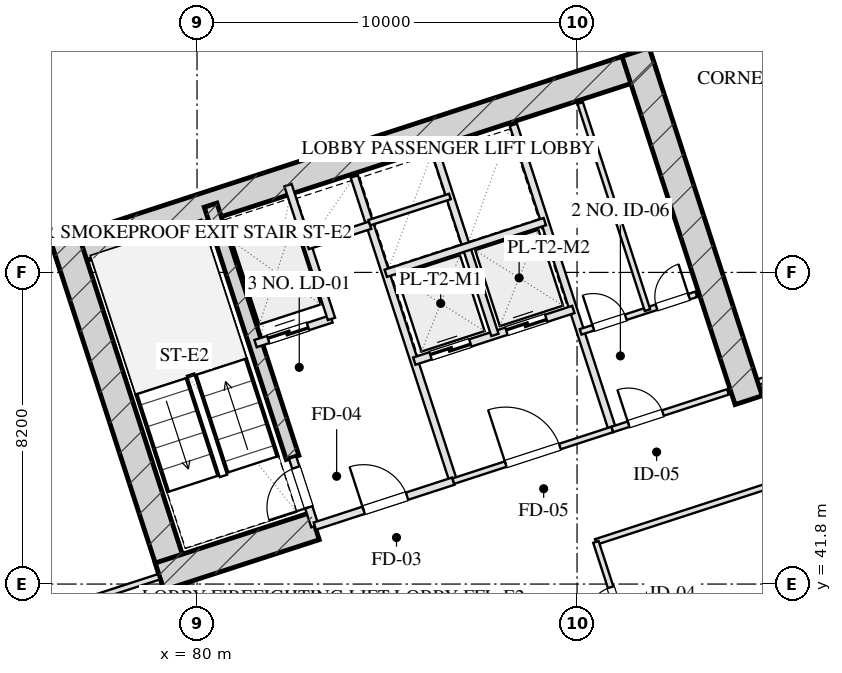
"""IFC4 building model, lengths in metres.
Left out: names, types, materials, properties, quantities, classifications, styles, units other than length and angle.
Written with IfcOpenShell. Run it as: python <this file> out.ifc"""

import sys

from ifc_helpers import new_model, si_unit, direction, frame, frame_2d, origin, place, context, subcontext, project, spatial, rectangle, extrude, element, fill, save


model = new_model("IFC4")
c1 = context("Model", 3, precision=1e-05, world=origin(), true_north=direction((0.0, 1.0)))
c2 = subcontext(c1, "Body", "Model", "MODEL_VIEW")
j1 = project(units=[si_unit("LENGTHUNIT", "METRE"), si_unit("PLANEANGLEUNIT", "RADIAN")], contexts=[c1])
p1 = place(None, origin())
s1 = spatial("IfcSite", under=j1, at=p1, CompositionType="ELEMENT")
p2 = place(p1, origin())
s2 = spatial("IfcBuilding", under=s1, at=p2, CompositionType="ELEMENT")
p3 = place(p2, frame((0.0, 0.0, 64.4)))
s3 = spatial("IfcBuildingStorey", under=s2, at=p3, CompositionType="ELEMENT", Elevation=64.4)
p4 = place(p3, frame((76.272, 50.443, 0.0), z_axis=(0.0, 0.0, 1.0), x_axis=(0.951056072937, 0.309018358888, 0.0)))
e1 = element("IfcWall", 1, at=p4, inside=s3, PredefinedType="SHEAR", context=c2, shape_type="SweptSolid", body=[
    extrude(rectangle(XDim=16.55, YDim=0.75, at=frame_2d((8.275, 0.0))), origin(), (0.0, 0.0, 1.0), 3.45),
])
for number, where, z_axis, x_axis in (
    (2, (79.489, 41.756, 0.0), (0.0, 0.0, 1.0), (-0.309, 0.951, 0.0)),
    (3, (94.515, 46.639, 0.0), (0.0, 0.0, 1.0), (-0.309, 0.951, 0.0)),
):
    element("IfcWall", number, at=place(p3, frame(where, z_axis=z_axis, x_axis=x_axis)), inside=s3, PredefinedType="SHEAR", context=c2, shape_type="SweptSolid", body=[
        extrude(rectangle(XDim=9.63, YDim=0.75, at=frame_2d((4.815, 0.0))), origin(), (0.0, 0.0, 1.0), 3.45),
    ])
p5 = place(p3, frame((82.514, 45.131, 0.0), z_axis=(0.0, 0.0, 1.0), x_axis=(-0.308988790936, 0.951065679686, 0.0)))
e4 = element("IfcWall", 4, at=p5, inside=s3, PredefinedType="SHEAR", context=c2, shape_type="SweptSolid", body=[
    extrude(rectangle(XDim=6.98, YDim=0.35, at=frame_2d((3.49, 0.0))), origin(), (0.0, 0.0, 1.0), 3.45),
])
p6 = place(p3, frame((79.016, 41.997, 0.0), z_axis=(0.0, 0.0, 1.0), x_axis=(0.95106038264, 0.309005094736, 0.0)))
e5 = element("IfcWall", 5, at=p6, inside=s3, PredefinedType="SHEAR", context=c2, shape_type="SweptSolid", body=[
    extrude(rectangle(XDim=4.295, YDim=0.75, at=frame_2d((2.147, 0.0))), origin(), (0.0, 0.0, 1.0), 3.45),
])
p7 = place(p3, frame((79.655, 4.352, 0.0), z_axis=(0.0, 0.0, 1.0), x_axis=(-0.309014526607, 0.951057318118, 0.0)))
e6 = element("IfcWall", 6, at=p7, inside=s3, PredefinedType="SOLIDWALL", context=c2, shape_type="SweptSolid", body=[
    extrude(rectangle(XDim=50.0, YDim=0.4, at=frame_2d((25.0, 0.0))), origin(), (0.0, 0.0, 1.0), 2.61),
])
p8 = place(p7, frame((17.35, 0.0, 0.75)))
e7 = element("IfcOpeningElement", 7, at=p8, cuts=e6, PredefinedType="OPENING", context=c2, shape_type="SweptSolid", body=[
    extrude(rectangle(XDim=2.5, YDim=1.46, at=frame_2d((1.25, 0.73))), frame((0.0, 0.21, 0.0), z_axis=(0.0, -1.0, 0.0), x_axis=(1.0, 0.0, 0.0)), (0.0, 0.0, 1.0), 0.42),
])
p9 = place(p7, frame((30.15, 0.0, 0.75)))
e8 = element("IfcOpeningElement", 8, at=p9, cuts=e6, PredefinedType="OPENING", context=c2, shape_type="SweptSolid", body=[
    extrude(rectangle(XDim=2.5, YDim=1.46, at=frame_2d((1.25, 0.73))), frame((0.0, 0.21, 0.0), z_axis=(0.0, -1.0, 0.0), x_axis=(1.0, 0.0, 0.0)), (0.0, 0.0, 1.0), 0.42),
])
p10 = place(p3, frame((66.002, 55.433, 0.0), z_axis=(0.0, 0.0, 1.0), x_axis=(0.951055939317, 0.309018770125, 0.0)))
e9 = element("IfcWall", 9, at=p10, inside=s3, PredefinedType="SOLIDWALL", context=c2, shape_type="SweptSolid", body=[
    extrude(rectangle(XDim=32.4, YDim=0.4, at=frame_2d((16.2, 0.0))), origin(), (0.0, 0.0, 1.0), 2.61),
])
p11 = place(p3, frame((83.101, 43.324, 0.0), z_axis=(0.0, 0.0, 1.0), x_axis=(-0.309048298632, 0.951046344356, 0.0)))
e10 = element("IfcWall", 10, at=p11, inside=s3, PredefinedType="PARTITIONING", context=c2, shape_type="SweptSolid", body=[
    extrude(rectangle(XDim=1.9, YDim=0.2, at=frame_2d((0.95, 0.0))), origin(), (0.0, 0.0, 1.0), 3.175),
])
p12 = place(p11, frame((0.52, 0.0, 0.0)))
e11 = element("IfcOpeningElement", 11, at=p12, cuts=e10, PredefinedType="OPENING", context=c2, shape_type="SweptSolid", body=[
    extrude(rectangle(XDim=1.1, YDim=2.05, at=frame_2d((0.55, 1.025))), frame((0.0, 0.11, 0.0), z_axis=(0.0, -1.0, 0.0), x_axis=(1.0, 0.0, 0.0)), (0.0, 0.0, 1.0), 0.22),
])
p13 = place(p3, frame((86.743, 44.508, 0.0), z_axis=(0.0, 0.0, 1.0), x_axis=(-0.309016001439, 0.951056838919, 0.0)))
e12 = element("IfcWall", 12, at=p13, inside=s3, PredefinedType="PARTITIONING", context=c2, shape_type="SweptSolid", body=[
    extrude(rectangle(XDim=8.43, YDim=0.2, at=frame_2d((4.215, 0.0))), origin(), (0.0, 0.0, 1.0), 3.175),
])
p14 = place(p3, frame((83.101, 43.324, 0.0), z_axis=(0.0, 0.0, 1.0), x_axis=(0.951052804469, 0.309028417967, 0.0)))
e13 = element("IfcWall", 13, at=p14, inside=s3, PredefinedType="PARTITIONING", context=c2, shape_type="SweptSolid", body=[
    extrude(rectangle(XDim=3.83, YDim=0.2, at=frame_2d((1.915, 0.0))), origin(), (0.0, 0.0, 1.0), 3.175),
])
p15 = place(p14, frame((1.35, 0.0, 0.0)))
e14 = element("IfcOpeningElement", 14, at=p15, cuts=e13, PredefinedType="OPENING", context=c2, shape_type="SweptSolid", body=[
    extrude(rectangle(XDim=1.2, YDim=2.05, at=frame_2d((0.6, 1.025))), frame((0.0, 0.11, 0.0), z_axis=(0.0, -1.0, 0.0), x_axis=(1.0, 0.0, 0.0)), (0.0, 0.0, 1.0), 0.22),
])
p16 = place(p3, frame((81.54, 48.127, 0.0), z_axis=(0.0, 0.0, 1.0), x_axis=(0.951062257173, 0.308999325213, 0.0)))
e15 = element("IfcWall", 15, at=p16, inside=s3, PredefinedType="PARTITIONING", context=c2, shape_type="SweptSolid", body=[
    extrude(rectangle(XDim=2.1, YDim=0.2, at=frame_2d((1.05, 0.0))), origin(), (0.0, 0.0, 1.0), 3.175),
])
p17 = place(p16, frame((0.35, 0.0, 0.0)))
e16 = element("IfcOpeningElement", 16, at=p17, cuts=e15, PredefinedType="OPENING", context=c2, shape_type="SweptSolid", body=[
    extrude(rectangle(XDim=1.1, YDim=2.05, at=frame_2d((0.55, 1.025))), frame((0.0, 0.11, 0.0), z_axis=(0.0, -1.0, 0.0), x_axis=(1.0, 0.0, 0.0)), (0.0, 0.0, 1.0), 0.22),
])
p18 = place(p3, frame((83.538, 48.776, 0.0), z_axis=(0.0, 0.0, 1.0), x_axis=(-0.3089935693, 0.951064127245, 0.0)))
e17 = element("IfcWall", 17, at=p18, inside=s3, PredefinedType="PARTITIONING", context=c2, shape_type="SweptSolid", body=[
    extrude(rectangle(XDim=3.7, YDim=0.2, at=frame_2d((1.85, 0.0))), origin(), (0.0, 0.0, 1.0), 3.175),
])
p19 = place(p3, frame((82.91, 50.707, 0.0), z_axis=(0.0, 0.0, 1.0), x_axis=(0.951041328149, 0.309063734775, 0.0)))
e18 = element("IfcWall", 18, at=p19, inside=s3, PredefinedType="PARTITIONING", context=c2, shape_type="SweptSolid", body=[
    extrude(rectangle(XDim=1.73, YDim=0.2, at=frame_2d((0.865, 0.0))), origin(), (0.0, 0.0, 1.0), 3.175),
])
p20 = place(p3, frame((90.928, 45.868, 0.0), z_axis=(0.0, 0.0, 1.0), x_axis=(-0.309042196757, 0.951048327176, 0.0)))
e19 = element("IfcWall", 19, at=p20, inside=s3, PredefinedType="PARTITIONING", context=c2, shape_type="SweptSolid", body=[
    extrude(rectangle(XDim=8.43, YDim=0.2, at=frame_2d((4.215, 0.0))), origin(), (0.0, 0.0, 1.0), 3.175),
])
p21 = place(p3, frame((86.743, 44.508, 0.0), z_axis=(0.0, 0.0, 1.0), x_axis=(0.951063829732, 0.308994485023, 0.0)))
e20 = element("IfcWall", 20, at=p21, inside=s3, PredefinedType="PARTITIONING", context=c2, shape_type="SweptSolid", body=[
    extrude(rectangle(XDim=4.4, YDim=0.15, at=frame_2d((2.2, 0.0))), origin(), (0.0, 0.0, 1.0), 3.175),
])
p22 = place(p21, frame((1.45, 0.0, 0.0)))
e21 = element("IfcOpeningElement", 21, at=p22, cuts=e20, PredefinedType="OPENING", context=c2, shape_type="SweptSolid", body=[
    extrude(rectangle(XDim=1.5, YDim=2.05, at=frame_2d((0.75, 1.025))), frame((0.0, 0.085, 0.0), z_axis=(0.0, -1.0, 0.0), x_axis=(1.0, 0.0, 0.0)), (0.0, 0.0, 1.0), 0.17),
])
p23 = place(p3, frame((85.718, 47.666, 0.0), z_axis=(0.0, 0.0, 1.0), x_axis=(0.951058531764, 0.30901079133, 0.0)))
e22 = element("IfcWall", 22, at=p23, inside=s3, PredefinedType="PARTITIONING", context=c2, shape_type="SweptSolid", body=[
    extrude(rectangle(XDim=4.4, YDim=0.2, at=frame_2d((2.2, 0.0))), origin(), (0.0, 0.0, 1.0), 3.175),
])
p24 = place(p23, frame((0.45, 0.0, 0.0)))
e23 = element("IfcOpeningElement", 23, at=p24, cuts=e22, PredefinedType="OPENING", context=c2, shape_type="SweptSolid", body=[
    extrude(rectangle(XDim=1.1, YDim=2.05, at=frame_2d((0.55, 1.025))), frame((0.0, 0.11, 0.0), z_axis=(0.0, -1.0, 0.0), x_axis=(1.0, 0.0, 0.0)), (0.0, 0.0, 1.0), 0.22),
])
p25 = place(p23, frame((2.55, 0.0, 0.0)))
e24 = element("IfcOpeningElement", 24, at=p25, cuts=e22, PredefinedType="OPENING", context=c2, shape_type="SweptSolid", body=[
    extrude(rectangle(XDim=1.1, YDim=2.05, at=frame_2d((0.55, 1.025))), frame((0.0, 0.11, 0.0), z_axis=(0.0, -1.0, 0.0), x_axis=(1.0, 0.0, 0.0)), (0.0, 0.0, 1.0), 0.22),
])
p26 = place(p3, frame((87.838, 48.354, 0.0), z_axis=(0.0, 0.0, 1.0), x_axis=(-0.3090093719, 0.951058992953, 0.0)))
e25 = element("IfcWall", 25, at=p26, inside=s3, PredefinedType="PARTITIONING", context=c2, shape_type="SweptSolid", body=[
    extrude(rectangle(XDim=5.11, YDim=0.2, at=frame_2d((2.555, 0.0))), origin(), (0.0, 0.0, 1.0), 3.175),
])
p27 = place(p3, frame((84.967, 49.977, 0.0), z_axis=(0.0, 0.0, 1.0), x_axis=(0.951063829732, 0.308994485023, 0.0)))
e26 = element("IfcWall", 26, at=p27, inside=s3, PredefinedType="PARTITIONING", context=c2, shape_type="SweptSolid", body=[
    extrude(rectangle(XDim=4.4, YDim=0.2, at=frame_2d((2.2, 0.0))), origin(), (0.0, 0.0, 1.0), 3.175),
])
p28 = place(p3, frame((84.534, 51.308, 0.0), z_axis=(0.0, 0.0, 1.0), x_axis=(0.951075093106, 0.308959814982, 0.0)))
e27 = element("IfcWall", 27, at=p28, inside=s3, PredefinedType="PARTITIONING", context=c2, shape_type="SweptSolid", body=[
    extrude(rectangle(XDim=2.23, YDim=0.15, at=frame_2d((1.115, 0.0))), origin(), (0.0, 0.0, 1.0), 3.175),
])
p29 = place(p3, frame((90.928, 45.868, 0.0), z_axis=(0.0, 0.0, 1.0), x_axis=(0.951059297078, 0.309008435874, 0.0)))
e28 = element("IfcWall", 28, at=p29, inside=s3, PredefinedType="PARTITIONING", context=c2, shape_type="SweptSolid", body=[
    extrude(rectangle(XDim=3.2, YDim=0.15, at=frame_2d((1.6, 0.0))), origin(), (0.0, 0.0, 1.0), 3.175),
])
p30 = place(p29, frame((0.45, 0.0, 0.0)))
e29 = element("IfcOpeningElement", 29, at=p30, cuts=e28, PredefinedType="OPENING", context=c2, shape_type="SweptSolid", body=[
    extrude(rectangle(XDim=0.95, YDim=2.05, at=frame_2d((0.475, 1.025))), frame((0.0, 0.085, 0.0), z_axis=(0.0, -1.0, 0.0), x_axis=(1.0, 0.0, 0.0)), (0.0, 0.0, 1.0), 0.17),
])
p31 = place(p3, frame((90.094, 48.436, 0.0), z_axis=(0.0, 0.0, 1.0), x_axis=(0.951066581729, 0.308986014439, 0.0)))
e30 = element("IfcWall", 30, at=p31, inside=s3, PredefinedType="PARTITIONING", context=c2, shape_type="SweptSolid", body=[
    extrude(rectangle(XDim=3.2, YDim=0.15, at=frame_2d((1.6, 0.0))), origin(), (0.0, 0.0, 1.0), 3.175),
])
p32 = place(p31, frame((0.35, 0.0, 0.0)))
e31 = element("IfcOpeningElement", 31, at=p32, cuts=e30, PredefinedType="OPENING", context=c2, shape_type="SweptSolid", body=[
    extrude(rectangle(XDim=0.9, YDim=2.05, at=frame_2d((0.45, 1.025))), frame((0.0, 0.085, 0.0), z_axis=(0.0, -1.0, 0.0), x_axis=(1.0, 0.0, 0.0)), (0.0, 0.0, 1.0), 0.17),
])
p33 = place(p31, frame((2.1, 0.0, 0.0)))
e32 = element("IfcOpeningElement", 32, at=p33, cuts=e30, PredefinedType="OPENING", context=c2, shape_type="SweptSolid", body=[
    extrude(rectangle(XDim=0.9, YDim=2.05, at=frame_2d((0.45, 1.025))), frame((0.0, 0.085, 0.0), z_axis=(0.0, -1.0, 0.0), x_axis=(1.0, 0.0, 0.0)), (0.0, 0.0, 1.0), 0.17),
])
p34 = place(p3, frame((91.853, 49.007, 0.0), z_axis=(0.0, 0.0, 1.0), x_axis=(-0.309022487551, 0.951054731437, 0.0)))
e33 = element("IfcWall", 33, at=p34, inside=s3, PredefinedType="PARTITIONING", context=c2, shape_type="SweptSolid", body=[
    extrude(rectangle(XDim=5.73, YDim=0.15, at=frame_2d((2.865, 0.0))), origin(), (0.0, 0.0, 1.0), 3.175),
])
p35 = place(p3, frame((68.721, 38.652, 0.0), z_axis=(0.0, 0.0, 1.0), x_axis=(0.951056658866, 0.309016555588, 0.0)))
e34 = element("IfcWall", 34, at=p35, inside=s3, PredefinedType="PARTITIONING", context=c2, shape_type="SweptSolid", body=[
    extrude(rectangle(XDim=10.8, YDim=0.15, at=frame_2d((5.4, 0.0))), origin(), (0.0, 0.0, 1.0), 3.175),
])
p36 = place(p35, frame((4.536, 0.0, 0.0)))
e35 = element("IfcOpeningElement", 35, at=p36, cuts=e34, PredefinedType="OPENING", context=c2, shape_type="SweptSolid", body=[
    extrude(rectangle(XDim=0.85, YDim=2.05, at=frame_2d((0.425, 1.025))), frame((0.0, 0.085, 0.0), z_axis=(0.0, -1.0, 0.0), x_axis=(1.0, 0.0, 0.0)), (0.0, 0.0, 1.0), 0.17),
])
p37 = place(p3, frame((94.78, 47.119, 0.0), z_axis=(0.0, 0.0, 1.0), x_axis=(0.951054294345, 0.309023832749, 0.0)))
e36 = element("IfcWall", 36, at=p37, inside=s3, PredefinedType="PARTITIONING", context=c2, shape_type="SweptSolid", body=[
    extrude(rectangle(XDim=10.2, YDim=0.15, at=frame_2d((5.1, 0.0))), origin(), (0.0, 0.0, 1.0), 3.175),
])
p38 = place(p37, frame((4.284, 0.0, 0.0)))
e37 = element("IfcOpeningElement", 37, at=p38, cuts=e36, PredefinedType="OPENING", context=c2, shape_type="SweptSolid", body=[
    extrude(rectangle(XDim=1.0, YDim=2.05, at=frame_2d((0.5, 1.025))), frame((0.0, 0.085, 0.0), z_axis=(0.0, -1.0, 0.0), x_axis=(1.0, 0.0, 0.0)), (0.0, 0.0, 1.0), 0.17),
])
p39 = place(p3, frame((69.549, 36.103, 0.0), z_axis=(0.0, 0.0, 1.0), x_axis=(0.951057299418, 0.309014584159, 0.0)))
e38 = element("IfcWall", 38, at=p39, inside=s3, PredefinedType="PARTITIONING", context=c2, shape_type="SweptSolid", body=[
    extrude(rectangle(XDim=17.375, YDim=0.15, at=frame_2d((8.688, 0.0))), origin(), (0.0, 0.0, 1.0), 3.175),
])
p40 = place(p3, frame((90.496, 42.909, 0.0), z_axis=(0.0, 0.0, 1.0), x_axis=(0.951055837847, 0.309019082414, 0.0)))
e39 = element("IfcWall", 39, at=p40, inside=s3, PredefinedType="PARTITIONING", context=c2, shape_type="SweptSolid", body=[
    extrude(rectangle(XDim=15.575, YDim=0.15, at=frame_2d((7.788, 0.0))), origin(), (0.0, 0.0, 1.0), 3.175),
])
p41 = place(p3, frame((95.638, 27.084, 0.0), z_axis=(0.0, 0.0, 1.0), x_axis=(-0.30901773025, 0.951056277195, 0.0)))
e40 = element("IfcWall", 40, at=p41, inside=s3, PredefinedType="PARTITIONING", context=c2, shape_type="SweptSolid", body=[
    extrude(rectangle(XDim=16.64, YDim=0.15, at=frame_2d((8.32, 0.0))), origin(), (0.0, 0.0, 1.0), 3.175),
])
p42 = place(p41, frame((1.655, 0.0, 0.0)))
e41 = element("IfcOpeningElement", 41, at=p42, cuts=e40, PredefinedType="OPENING", context=c2, shape_type="SweptSolid", body=[
    extrude(rectangle(XDim=1.0, YDim=2.05, at=frame_2d((0.5, 1.025))), frame((0.0, 0.085, 0.0), z_axis=(0.0, -1.0, 0.0), x_axis=(1.0, 0.0, 0.0)), (0.0, 0.0, 1.0), 0.17),
])
p43 = place(p41, frame((6.155, 0.0, 0.0)))
e42 = element("IfcOpeningElement", 42, at=p43, cuts=e40, PredefinedType="OPENING", context=c2, shape_type="SweptSolid", body=[
    extrude(rectangle(XDim=1.0, YDim=2.05, at=frame_2d((0.5, 1.025))), frame((0.0, 0.085, 0.0), z_axis=(0.0, -1.0, 0.0), x_axis=(1.0, 0.0, 0.0)), (0.0, 0.0, 1.0), 0.17),
])
p44 = place(p41, frame((10.565, 0.0, 0.0)))
e43 = element("IfcOpeningElement", 43, at=p44, cuts=e40, PredefinedType="OPENING", context=c2, shape_type="SweptSolid", body=[
    extrude(rectangle(XDim=1.0, YDim=2.05, at=frame_2d((0.5, 1.025))), frame((0.0, 0.085, 0.0), z_axis=(0.0, -1.0, 0.0), x_axis=(1.0, 0.0, 0.0)), (0.0, 0.0, 1.0), 0.17),
])
p45 = place(p41, frame((14.385, 0.0, 0.0)))
e44 = element("IfcOpeningElement", 44, at=p45, cuts=e40, PredefinedType="OPENING", context=c2, shape_type="SweptSolid", body=[
    extrude(rectangle(XDim=1.0, YDim=2.05, at=frame_2d((0.5, 1.025))), frame((0.0, 0.085, 0.0), z_axis=(0.0, -1.0, 0.0), x_axis=(1.0, 0.0, 0.0)), (0.0, 0.0, 1.0), 0.17),
])
p46 = place(p3, frame((91.581, 39.57, 0.0), z_axis=(0.0, 0.0, 1.0), x_axis=(0.951055837847, 0.309019082414, 0.0)))
e45 = element("IfcWall", 45, at=p46, inside=s3, PredefinedType="PARTITIONING", context=c2, shape_type="SweptSolid", body=[
    extrude(rectangle(XDim=15.575, YDim=0.15, at=frame_2d((7.788, 0.0))), origin(), (0.0, 0.0, 1.0), 3.175),
])
p47 = place(p12, origin())
e46 = element("IfcDoor", 46, at=p47, inside=s3, OperationType="SINGLE_SWING_LEFT", PredefinedType="DOOR", context=c2, shape_type="SweptSolid", body=[
    extrude(rectangle(XDim=1.1, YDim=2.05, at=frame_2d((0.55, 1.025))), frame((0.0, 0.025, 0.0), z_axis=(0.0, -1.0, 0.0), x_axis=(1.0, 0.0, 0.0)), (0.0, 0.0, 1.0), 0.05),
])
fill(e11, e46)
p48 = place(p15, origin())
e47 = element("IfcDoor", 47, at=p48, inside=s3, OperationType="SINGLE_SWING_LEFT", PredefinedType="DOOR", context=c2, shape_type="SweptSolid", body=[
    extrude(rectangle(XDim=1.2, YDim=2.05, at=frame_2d((0.6, 1.025))), frame((0.0, 0.025, 0.0), z_axis=(0.0, -1.0, 0.0), x_axis=(1.0, 0.0, 0.0)), (0.0, 0.0, 1.0), 0.05),
])
fill(e14, e47)
p49 = place(p17, origin())
e48 = element("IfcDoor", 48, at=p49, inside=s3, OperationType="DOUBLE_DOOR_SLIDING", PredefinedType="DOOR", context=c2, shape_type="SweptSolid", body=[
    extrude(rectangle(XDim=1.1, YDim=2.05, at=frame_2d((0.55, 1.025))), frame((0.0, 0.025, 0.0), z_axis=(0.0, -1.0, 0.0), x_axis=(1.0, 0.0, 0.0)), (0.0, 0.0, 1.0), 0.05),
])
fill(e16, e48)
p50 = place(p22, origin())
e49 = element("IfcDoor", 49, at=p50, inside=s3, OperationType="SINGLE_SWING_LEFT", PredefinedType="DOOR", context=c2, shape_type="SweptSolid", body=[
    extrude(rectangle(XDim=1.5, YDim=2.05, at=frame_2d((0.75, 1.025))), frame((0.0, 0.025, 0.0), z_axis=(0.0, -1.0, 0.0), x_axis=(1.0, 0.0, 0.0)), (0.0, 0.0, 1.0), 0.05),
])
fill(e21, e49)
p51 = place(p24, origin())
e50 = element("IfcDoor", 50, at=p51, inside=s3, OperationType="DOUBLE_DOOR_SLIDING", PredefinedType="DOOR", context=c2, shape_type="SweptSolid", body=[
    extrude(rectangle(XDim=1.1, YDim=2.05, at=frame_2d((0.55, 1.025))), frame((0.0, 0.025, 0.0), z_axis=(0.0, -1.0, 0.0), x_axis=(1.0, 0.0, 0.0)), (0.0, 0.0, 1.0), 0.05),
])
fill(e23, e50)
p52 = place(p25, origin())
e51 = element("IfcDoor", 51, at=p52, inside=s3, OperationType="DOUBLE_DOOR_SLIDING", PredefinedType="DOOR", context=c2, shape_type="SweptSolid", body=[
    extrude(rectangle(XDim=1.1, YDim=2.05, at=frame_2d((0.55, 1.025))), frame((0.0, 0.025, 0.0), z_axis=(0.0, -1.0, 0.0), x_axis=(1.0, 0.0, 0.0)), (0.0, 0.0, 1.0), 0.05),
])
fill(e24, e51)
p53 = place(p30, origin())
e52 = element("IfcDoor", 52, at=p53, inside=s3, OperationType="SINGLE_SWING_LEFT", PredefinedType="DOOR", context=c2, shape_type="SweptSolid", body=[
    extrude(rectangle(XDim=0.95, YDim=2.05, at=frame_2d((0.475, 1.025))), frame((0.0, 0.025, 0.0), z_axis=(0.0, -1.0, 0.0), x_axis=(1.0, 0.0, 0.0)), (0.0, 0.0, 1.0), 0.05),
])
fill(e29, e52)
p54 = place(p32, origin())
e53 = element("IfcDoor", 53, at=p54, inside=s3, OperationType="SINGLE_SWING_LEFT", PredefinedType="DOOR", context=c2, shape_type="SweptSolid", body=[
    extrude(rectangle(XDim=0.9, YDim=2.05, at=frame_2d((0.45, 1.025))), frame((0.0, 0.025, 0.0), z_axis=(0.0, -1.0, 0.0), x_axis=(1.0, 0.0, 0.0)), (0.0, 0.0, 1.0), 0.05),
])
fill(e31, e53)
p55 = place(p33, origin())
e54 = element("IfcDoor", 54, at=p55, inside=s3, OperationType="SINGLE_SWING_RIGHT", PredefinedType="DOOR", context=c2, shape_type="SweptSolid", body=[
    extrude(rectangle(XDim=0.9, YDim=2.05, at=frame_2d((0.45, 1.025))), frame((0.0, 0.025, 0.0), z_axis=(0.0, -1.0, 0.0), x_axis=(1.0, 0.0, 0.0)), (0.0, 0.0, 1.0), 0.05),
])
fill(e32, e54)
p56 = place(p45, origin())
e55 = element("IfcDoor", 55, at=p56, inside=s3, OperationType="SINGLE_SWING_LEFT", PredefinedType="DOOR", context=c2, shape_type="SweptSolid", body=[
    extrude(rectangle(XDim=1.0, YDim=2.05, at=frame_2d((0.5, 1.025))), frame((0.0, 0.025, 0.0), z_axis=(0.0, -1.0, 0.0), x_axis=(1.0, 0.0, 0.0)), (0.0, 0.0, 1.0), 0.05),
])
fill(e44, e55)
save(model, sys.argv[1])
